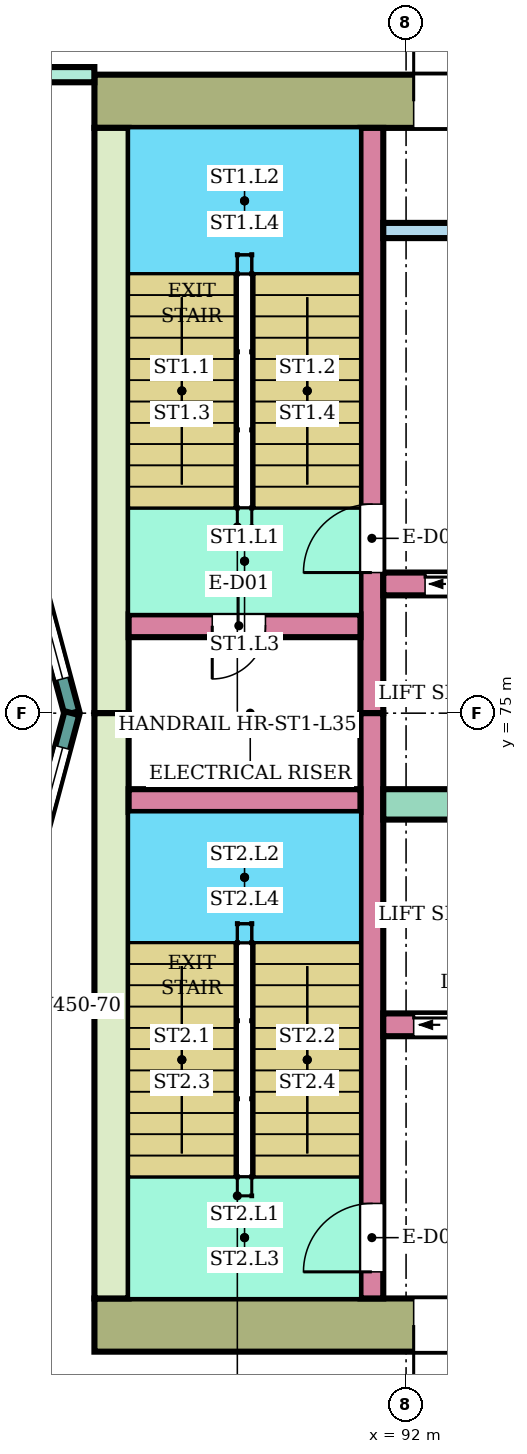
"""IFC4 building model, lengths in metres.
Left out: names, types, materials, properties, quantities, classifications, styles, units other than length and angle.
Written with IfcOpenShell. Run it as: python <this file> out.ifc"""

import sys

from ifc_helpers import new_model, si_unit, direction, frame, frame_2d, origin, place, context, subcontext, project, spatial, rectangle, extrude, element, fill, save


model = new_model("IFC4")
c1 = context("Model", 3, precision=1e-05, world=origin(), true_north=direction((0.0, 1.0)))
c2 = subcontext(c1, "Body", "Model", "MODEL_VIEW")
j1 = project(units=[si_unit("LENGTHUNIT", "METRE"), si_unit("PLANEANGLEUNIT", "RADIAN")], contexts=[c1])
p1 = place(None, origin())
s1 = spatial("IfcSite", under=j1, at=p1, CompositionType="ELEMENT")
p2 = place(p1, origin())
s2 = spatial("IfcBuilding", under=s1, at=p2, CompositionType="ELEMENT")
p3 = place(p2, frame((0.0, 0.0, 149.7)))
s3 = spatial("IfcBuildingStorey", under=s2, at=p3, CompositionType="ELEMENT", Elevation=149.7)
p4 = place(p3, frame((87.9, 83.05, 0.0), z_axis=(0.0, 0.0, 1.0), x_axis=(1.0, 0.0, 0.0)))
e1 = element("IfcWall", 1, at=p4, inside=s3, PredefinedType="SHEAR", context=c2, shape_type="SweptSolid", body=[
    extrude(rectangle(XDim=14.8, YDim=0.7, at=frame_2d((7.4, 0.0))), origin(), (0.0, 0.0, 1.0), 7.68),
])
p5 = place(p4, frame((4.2, 0.0, 0.0)))
e2 = element("IfcOpeningElement", 2, at=p5, cuts=e1, PredefinedType="OPENING", context=c2, shape_type="SweptSolid", body=[
    extrude(rectangle(XDim=2.4, YDim=2.4, at=frame_2d((1.2, 1.2))), frame((0.0, 0.36, 0.0), z_axis=(0.0, -1.0, 0.0), x_axis=(1.0, 0.0, 0.0)), (0.0, 0.0, 1.0), 0.72),
])
p6 = place(p3, frame((87.9, 66.95, 0.0), z_axis=(0.0, 0.0, 1.0), x_axis=(1.0, 0.0, 0.0)))
e3 = element("IfcWall", 3, at=p6, inside=s3, PredefinedType="SHEAR", context=c2, shape_type="SweptSolid", body=[
    extrude(rectangle(XDim=14.8, YDim=0.7, at=frame_2d((7.4, 0.0))), origin(), (0.0, 0.0, 1.0), 7.68),
])
p7 = place(p6, frame((4.2, 0.0, 0.0)))
e4 = element("IfcOpeningElement", 4, at=p7, cuts=e3, PredefinedType="OPENING", context=c2, shape_type="SweptSolid", body=[
    extrude(rectangle(XDim=2.4, YDim=2.4, at=frame_2d((1.2, 1.2))), frame((0.0, 0.36, 0.0), z_axis=(0.0, -1.0, 0.0), x_axis=(1.0, 0.0, 0.0)), (0.0, 0.0, 1.0), 0.72),
])
for number, where, z_axis, x_axis in (
    (5, (88.125, 75.0, 0.0), (0.0, 0.0, 1.0), (0.0, 1.0, 0.0)),
    (6, (88.125, 67.3, 0.0), (0.0, 0.0, 1.0), (0.0, 1.0, 0.0)),
):
    element("IfcWall", number, at=place(p3, frame(where, z_axis=z_axis, x_axis=x_axis)), inside=s3, PredefinedType="SHEAR", context=c2, shape_type="SweptSolid", body=[
        extrude(rectangle(XDim=7.7, YDim=0.45, at=frame_2d((3.85, 0.0))), origin(), (0.0, 0.0, 1.0), 7.68),
    ])
p8 = place(p3, frame((91.55, 75.0, 0.0), z_axis=(0.0, 0.0, 1.0), x_axis=(0.0, 1.0, 0.0)))
e7 = element("IfcWall", 7, at=p8, inside=s3, PredefinedType="SHEAR", context=c2, shape_type="SweptSolid", body=[
    extrude(rectangle(XDim=7.7, YDim=0.3, at=frame_2d((3.85, 0.0))), origin(), (0.0, 0.0, 1.0), 7.68),
])
p9 = place(p8, frame((1.85, 0.0, 0.0)))
e8 = element("IfcOpeningElement", 8, at=p9, cuts=e7, PredefinedType="OPENING", context=c2, shape_type="SweptSolid", body=[
    extrude(rectangle(XDim=0.9, YDim=2.1, at=frame_2d((0.45, 1.05))), frame((0.0, 0.16, 0.0), z_axis=(0.0, -1.0, 0.0), x_axis=(1.0, 0.0, 0.0)), (0.0, 0.0, 1.0), 0.32),
])
p10 = place(p3, frame((91.55, 67.3, 0.0), z_axis=(0.0, 0.0, 1.0), x_axis=(0.0, 1.0, 0.0)))
e9 = element("IfcWall", 9, at=p10, inside=s3, PredefinedType="SHEAR", context=c2, shape_type="SweptSolid", body=[
    extrude(rectangle(XDim=7.7, YDim=0.3, at=frame_2d((3.85, 0.0))), origin(), (0.0, 0.0, 1.0), 7.68),
])
p11 = place(p10, frame((0.35, 0.0, 0.0)))
e10 = element("IfcOpeningElement", 10, at=p11, cuts=e9, PredefinedType="OPENING", context=c2, shape_type="SweptSolid", body=[
    extrude(rectangle(XDim=0.9, YDim=2.1, at=frame_2d((0.45, 1.05))), frame((0.0, 0.16, 0.0), z_axis=(0.0, -1.0, 0.0), x_axis=(1.0, 0.0, 0.0)), (0.0, 0.0, 1.0), 0.32),
])
p12 = place(p3, frame((88.35, 76.15, 0.0), z_axis=(0.0, 0.0, 1.0), x_axis=(1.0, 0.0, 0.0)))
e11 = element("IfcWall", 11, at=p12, inside=s3, PredefinedType="SHEAR", context=c2, shape_type="SweptSolid", body=[
    extrude(rectangle(XDim=3.05, YDim=0.3, at=frame_2d((1.525, 0.0))), origin(), (0.0, 0.0, 1.0), 7.68),
])
p13 = place(p12, frame((1.1, 0.0, 0.0)))
e12 = element("IfcOpeningElement", 12, at=p13, cuts=e11, PredefinedType="OPENING", context=c2, shape_type="SweptSolid", body=[
    extrude(rectangle(XDim=0.7, YDim=2.0, at=frame_2d((0.35, 1.0))), frame((0.0, 0.16, 0.0), z_axis=(0.0, -1.0, 0.0), x_axis=(1.0, 0.0, 0.0)), (0.0, 0.0, 1.0), 0.32),
])
p14 = place(p3, frame((88.35, 73.85, 0.0), z_axis=(0.0, 0.0, 1.0), x_axis=(1.0, 0.0, 0.0)))
e13 = element("IfcWall", 13, at=p14, inside=s3, PredefinedType="SHEAR", context=c2, shape_type="SweptSolid", body=[
    extrude(rectangle(XDim=3.05, YDim=0.3, at=frame_2d((1.525, 0.0))), origin(), (0.0, 0.0, 1.0), 7.68),
])
p15 = place(p3, frame((91.7, 76.7, 0.0), z_axis=(0.0, 0.0, 1.0), x_axis=(1.0, 0.0, 0.0)))
e14 = element("IfcWall", 14, at=p15, inside=s3, PredefinedType="SHEAR", context=c2, shape_type="SweptSolid", body=[
    extrude(rectangle(XDim=11.0, YDim=0.3, at=frame_2d((5.5, 0.0))), origin(), (0.0, 0.0, 1.0), 7.68),
])
p16 = place(p15, frame((0.55, 0.0, 0.0)))
e15 = element("IfcOpeningElement", 15, at=p16, cuts=e14, PredefinedType="OPENING", context=c2, shape_type="SweptSolid", body=[
    extrude(rectangle(XDim=1.1, YDim=2.1, at=frame_2d((0.55, 1.05))), frame((0.0, 0.16, 0.0), z_axis=(0.0, -1.0, 0.0), x_axis=(1.0, 0.0, 0.0)), (0.0, 0.0, 1.0), 0.32),
])
p17 = place(p15, frame((3.0, 0.0, 0.0)))
e16 = element("IfcOpeningElement", 16, at=p17, cuts=e14, PredefinedType="OPENING", context=c2, shape_type="SweptSolid", body=[
    extrude(rectangle(XDim=1.2, YDim=2.1, at=frame_2d((0.6, 1.05))), frame((0.0, 0.16, 0.0), z_axis=(0.0, -1.0, 0.0), x_axis=(1.0, 0.0, 0.0)), (0.0, 0.0, 1.0), 0.32),
])
p18 = place(p15, frame((5.5, 0.0, 0.0)))
e17 = element("IfcOpeningElement", 17, at=p18, cuts=e14, PredefinedType="OPENING", context=c2, shape_type="SweptSolid", body=[
    extrude(rectangle(XDim=1.2, YDim=2.1, at=frame_2d((0.6, 1.05))), frame((0.0, 0.16, 0.0), z_axis=(0.0, -1.0, 0.0), x_axis=(1.0, 0.0, 0.0)), (0.0, 0.0, 1.0), 0.32),
])
p19 = place(p15, frame((8.1, 0.0, 0.0)))
e18 = element("IfcOpeningElement", 18, at=p19, cuts=e14, PredefinedType="OPENING", context=c2, shape_type="SweptSolid", body=[
    extrude(rectangle(XDim=1.0, YDim=2.1, at=frame_2d((0.5, 1.05))), frame((0.0, 0.16, 0.0), z_axis=(0.0, -1.0, 0.0), x_axis=(1.0, 0.0, 0.0)), (0.0, 0.0, 1.0), 0.32),
])
p20 = place(p3, frame((91.7, 73.8, 0.0), z_axis=(0.0, 0.0, 1.0), x_axis=(1.0, 0.0, 0.0)))
e19 = element("IfcWall", 19, at=p20, inside=s3, PredefinedType="SHEAR", context=c2, shape_type="SweptSolid", body=[
    extrude(rectangle(XDim=11.0, YDim=0.4, at=frame_2d((5.5, 0.0))), origin(), (0.0, 0.0, 1.0), 7.68),
])
p21 = place(p3, frame((91.7, 70.9, 0.0), z_axis=(0.0, 0.0, 1.0), x_axis=(1.0, 0.0, 0.0)))
e20 = element("IfcWall", 20, at=p21, inside=s3, PredefinedType="SHEAR", context=c2, shape_type="SweptSolid", body=[
    extrude(rectangle(XDim=11.0, YDim=0.3, at=frame_2d((5.5, 0.0))), origin(), (0.0, 0.0, 1.0), 7.68),
])
p22 = place(p21, frame((0.4, 0.0, 0.0)))
e21 = element("IfcOpeningElement", 21, at=p22, cuts=e20, PredefinedType="OPENING", context=c2, shape_type="SweptSolid", body=[
    extrude(rectangle(XDim=1.4, YDim=2.1, at=frame_2d((0.7, 1.05))), frame((0.0, 0.16, 0.0), z_axis=(0.0, -1.0, 0.0), x_axis=(1.0, 0.0, 0.0)), (0.0, 0.0, 1.0), 0.32),
])
p23 = place(p21, frame((3.0, 0.0, 0.0)))
e22 = element("IfcOpeningElement", 22, at=p23, cuts=e20, PredefinedType="OPENING", context=c2, shape_type="SweptSolid", body=[
    extrude(rectangle(XDim=1.2, YDim=2.1, at=frame_2d((0.6, 1.05))), frame((0.0, 0.16, 0.0), z_axis=(0.0, -1.0, 0.0), x_axis=(1.0, 0.0, 0.0)), (0.0, 0.0, 1.0), 0.32),
])
p24 = place(p21, frame((5.4, 0.0, 0.0)))
e23 = element("IfcOpeningElement", 23, at=p24, cuts=e20, PredefinedType="OPENING", context=c2, shape_type="SweptSolid", body=[
    extrude(rectangle(XDim=1.4, YDim=2.1, at=frame_2d((0.7, 1.05))), frame((0.0, 0.16, 0.0), z_axis=(0.0, -1.0, 0.0), x_axis=(1.0, 0.0, 0.0)), (0.0, 0.0, 1.0), 0.32),
])
p25 = place(p21, frame((8.1, 0.0, 0.0)))
e24 = element("IfcOpeningElement", 24, at=p25, cuts=e20, PredefinedType="OPENING", context=c2, shape_type="SweptSolid", body=[
    extrude(rectangle(XDim=1.0, YDim=2.1, at=frame_2d((0.5, 1.05))), frame((0.0, 0.16, 0.0), z_axis=(0.0, -1.0, 0.0), x_axis=(1.0, 0.0, 0.0)), (0.0, 0.0, 1.0), 0.32),
])
p26 = place(p3, frame((91.7, 81.35, 0.0), z_axis=(0.0, 0.0, 1.0), x_axis=(1.0, 0.0, 0.0)))
e25 = element("IfcWall", 25, at=p26, inside=s3, PredefinedType="SHEAR", context=c2, shape_type="SweptSolid", body=[
    extrude(rectangle(XDim=4.5, YDim=0.2, at=frame_2d((2.25, 0.0))), origin(), (0.0, 0.0, 1.0), 7.68),
])
p27 = place(p3, frame((87.604, 75.0, 0.0), z_axis=(0.0, 0.0, 1.0), x_axis=(-0.258789828301, 0.965933654434, 0.0)))
e26 = element("IfcWall", 26, at=p27, inside=s3, PredefinedType="NOTDEFINED", context=c2, shape_type="SweptSolid", body=[
    extrude(rectangle(XDim=3.936, YDim=0.2, at=frame_2d((1.968, 0.0))), origin(), (0.0, 0.0, 1.0), 8.0),
])
p28 = place(p27, frame((0.468, 0.0, 0.9)))
e27 = element("IfcOpeningElement", 27, at=p28, cuts=e26, PredefinedType="OPENING", context=c2, shape_type="SweptSolid", body=[
    extrude(rectangle(XDim=3.0, YDim=2.3, at=frame_2d((1.5, 1.15))), frame((0.0, 0.11, 0.0), z_axis=(0.0, -1.0, 0.0), x_axis=(1.0, 0.0, 0.0)), (0.0, 0.0, 1.0), 0.22),
])
p29 = place(p3, frame((86.585, 71.198, 0.0), z_axis=(0.0, 0.0, 1.0), x_axis=(0.258789828301, 0.965933654434, 0.0)))
e28 = element("IfcWall", 28, at=p29, inside=s3, PredefinedType="NOTDEFINED", context=c2, shape_type="SweptSolid", body=[
    extrude(rectangle(XDim=3.936, YDim=0.2, at=frame_2d((1.968, 0.0))), origin(), (0.0, 0.0, 1.0), 8.0),
])
p30 = place(p29, frame((0.468, 0.0, 0.9)))
e29 = element("IfcOpeningElement", 29, at=p30, cuts=e28, PredefinedType="OPENING", context=c2, shape_type="SweptSolid", body=[
    extrude(rectangle(XDim=3.0, YDim=2.3, at=frame_2d((1.5, 1.15))), frame((0.0, 0.11, 0.0), z_axis=(0.0, -1.0, 0.0), x_axis=(1.0, 0.0, 0.0)), (0.0, 0.0, 1.0), 0.22),
])
p31 = place(p3, frame((84.5, 82.794, 0.0), z_axis=(0.0, 0.0, 1.0), x_axis=(0.499999880539, 0.866025472755, 0.0)))
e30 = element("IfcWall", 30, at=p31, inside=s3, PredefinedType="NOTDEFINED", context=c2, shape_type="SweptSolid", body=[
    extrude(rectangle(XDim=8.1, YDim=0.2, at=frame_2d((4.05, 0.0))), origin(), (0.0, 0.0, 1.0), 8.0),
])
p32 = place(p31, frame((1.0, 0.0, 0.3)))
e31 = element("IfcOpeningElement", 31, at=p32, cuts=e30, PredefinedType="OPENING", context=c2, shape_type="SweptSolid", body=[
    extrude(rectangle(XDim=2.4, YDim=3.6, at=frame_2d((1.2, 1.8))), frame((0.0, 0.11, 0.0), z_axis=(0.0, -1.0, 0.0), x_axis=(1.0, 0.0, 0.0)), (0.0, 0.0, 1.0), 0.22),
])
p33 = place(p31, frame((3.85, 0.0, 0.0)))
e32 = element("IfcOpeningElement", 32, at=p33, cuts=e30, PredefinedType="OPENING", context=c2, shape_type="SweptSolid", body=[
    extrude(rectangle(XDim=1.8, YDim=2.4, at=frame_2d((0.9, 1.2))), frame((0.0, 0.11, 0.0), z_axis=(0.0, -1.0, 0.0), x_axis=(1.0, 0.0, 0.0)), (0.0, 0.0, 1.0), 0.22),
])
p34 = place(p31, frame((6.1, 0.0, 0.3)))
e33 = element("IfcOpeningElement", 33, at=p34, cuts=e30, PredefinedType="OPENING", context=c2, shape_type="SweptSolid", body=[
    extrude(rectangle(XDim=1.6, YDim=3.6, at=frame_2d((0.8, 1.8))), frame((0.0, 0.11, 0.0), z_axis=(0.0, -1.0, 0.0), x_axis=(1.0, 0.0, 0.0)), (0.0, 0.0, 1.0), 0.22),
])
p35 = place(p3, frame((84.5, 67.206, 0.0), z_axis=(0.0, 0.0, 1.0), x_axis=(0.499999880539, -0.866025472755, 0.0)))
e34 = element("IfcWall", 34, at=p35, inside=s3, PredefinedType="NOTDEFINED", context=c2, shape_type="SweptSolid", body=[
    extrude(rectangle(XDim=8.1, YDim=0.2, at=frame_2d((4.05, 0.0))), origin(), (0.0, 0.0, 1.0), 8.0),
])
p36 = place(p35, frame((1.0, 0.0, 0.3)))
e35 = element("IfcOpeningElement", 35, at=p36, cuts=e34, PredefinedType="OPENING", context=c2, shape_type="SweptSolid", body=[
    extrude(rectangle(XDim=2.4, YDim=3.6, at=frame_2d((1.2, 1.8))), frame((0.0, 0.11, 0.0), z_axis=(0.0, -1.0, 0.0), x_axis=(1.0, 0.0, 0.0)), (0.0, 0.0, 1.0), 0.22),
])
p37 = place(p35, frame((3.85, 0.0, 0.0)))
e36 = element("IfcOpeningElement", 36, at=p37, cuts=e34, PredefinedType="OPENING", context=c2, shape_type="SweptSolid", body=[
    extrude(rectangle(XDim=1.8, YDim=2.4, at=frame_2d((0.9, 1.2))), frame((0.0, 0.11, 0.0), z_axis=(0.0, -1.0, 0.0), x_axis=(1.0, 0.0, 0.0)), (0.0, 0.0, 1.0), 0.22),
])
p38 = place(p35, frame((6.1, 0.0, 0.3)))
e37 = element("IfcOpeningElement", 37, at=p38, cuts=e34, PredefinedType="OPENING", context=c2, shape_type="SweptSolid", body=[
    extrude(rectangle(XDim=1.6, YDim=3.6, at=frame_2d((0.8, 1.8))), frame((0.0, 0.11, 0.0), z_axis=(0.0, -1.0, 0.0), x_axis=(1.0, 0.0, 0.0)), (0.0, 0.0, 1.0), 0.22),
])
p39 = place(p3, frame((84.851, 83.4, 0.0), z_axis=(0.0, 0.0, 1.0), x_axis=(1.0, 0.0, 0.0)))
e38 = element("IfcWall", 38, at=p39, inside=s3, PredefinedType="PARTITIONING", context=c2, shape_type="SweptSolid", body=[
    extrude(rectangle(XDim=3.048, YDim=0.2, at=frame_2d((1.524, 0.0))), origin(), (0.0, 0.0, 1.0), 7.55),
])
p40 = place(p28, origin())
e39 = element("IfcWindow", 39, at=p40, inside=s3, PartitioningType="SINGLE_PANEL", PredefinedType="WINDOW", context=c2, shape_type="SweptSolid", body=[
    extrude(rectangle(XDim=3.0, YDim=2.3, at=frame_2d((1.5, 1.15))), frame((0.0, 0.03, 0.0), z_axis=(0.0, -1.0, 0.0), x_axis=(1.0, 0.0, 0.0)), (0.0, 0.0, 1.0), 0.06),
])
fill(e27, e39)
p41 = place(p30, origin())
e40 = element("IfcWindow", 40, at=p41, inside=s3, PartitioningType="SINGLE_PANEL", PredefinedType="WINDOW", context=c2, shape_type="SweptSolid", body=[
    extrude(rectangle(XDim=3.0, YDim=2.3, at=frame_2d((1.5, 1.15))), frame((0.0, 0.03, 0.0), z_axis=(0.0, -1.0, 0.0), x_axis=(1.0, 0.0, 0.0)), (0.0, 0.0, 1.0), 0.06),
])
fill(e29, e40)
p42 = place(p13, frame((0.7, 0.0, 0.0), z_axis=(0.0, 0.0, 1.0), x_axis=(-1.0, 0.0, 0.0)))
e41 = element("IfcDoor", 41, at=p42, inside=s3, OperationType="SINGLE_SWING_RIGHT", PredefinedType="DOOR", context=c2, shape_type="SweptSolid", body=[
    extrude(rectangle(XDim=0.7, YDim=2.0, at=frame_2d((0.35, 1.0))), frame((0.0, 0.025, 0.0), z_axis=(0.0, -1.0, 0.0), x_axis=(1.0, 0.0, 0.0)), (0.0, 0.0, 1.0), 0.05),
])
fill(e12, e41)
p43 = place(p9, origin())
e42 = element("IfcDoor", 42, at=p43, inside=s3, OperationType="SINGLE_SWING_LEFT", PredefinedType="DOOR", context=c2, shape_type="SweptSolid", body=[
    extrude(rectangle(XDim=0.9, YDim=2.1, at=frame_2d((0.45, 1.05))), frame((0.0, 0.025, 0.0), z_axis=(0.0, -1.0, 0.0), x_axis=(1.0, 0.0, 0.0)), (0.0, 0.0, 1.0), 0.05),
])
fill(e8, e42)
p44 = place(p11, origin())
e43 = element("IfcDoor", 43, at=p44, inside=s3, OperationType="SINGLE_SWING_LEFT", PredefinedType="DOOR", context=c2, shape_type="SweptSolid", body=[
    extrude(rectangle(XDim=0.9, YDim=2.1, at=frame_2d((0.45, 1.05))), frame((0.0, 0.025, 0.0), z_axis=(0.0, -1.0, 0.0), x_axis=(1.0, 0.0, 0.0)), (0.0, 0.0, 1.0), 0.05),
])
fill(e10, e43)
p45 = place(p16, origin())
e44 = element("IfcDoor", 44, at=p45, inside=s3, OperationType="DOUBLE_DOOR_SLIDING", PredefinedType="DOOR", context=c2, shape_type="SweptSolid", body=[
    extrude(rectangle(XDim=1.1, YDim=2.1, at=frame_2d((0.55, 1.05))), frame((0.0, 0.025, 0.0), z_axis=(0.0, -1.0, 0.0), x_axis=(1.0, 0.0, 0.0)), (0.0, 0.0, 1.0), 0.05),
])
fill(e15, e44)
p46 = place(p22, origin())
e45 = element("IfcDoor", 45, at=p46, inside=s3, OperationType="DOUBLE_DOOR_SLIDING", PredefinedType="DOOR", context=c2, shape_type="SweptSolid", body=[
    extrude(rectangle(XDim=1.4, YDim=2.1, at=frame_2d((0.7, 1.05))), frame((0.0, 0.025, 0.0), z_axis=(0.0, -1.0, 0.0), x_axis=(1.0, 0.0, 0.0)), (0.0, 0.0, 1.0), 0.05),
])
fill(e21, e45)
p47 = place(p5, origin())
e46 = element("IfcDoor", 46, at=p47, inside=s3, OperationType="DOUBLE_DOOR_SINGLE_SWING", PredefinedType="DOOR", context=c2, shape_type="SweptSolid", body=[
    extrude(rectangle(XDim=2.4, YDim=2.4, at=frame_2d((1.2, 1.2))), frame((0.0, 0.025, 0.0), z_axis=(0.0, -1.0, 0.0), x_axis=(1.0, 0.0, 0.0)), (0.0, 0.0, 1.0), 0.05),
])
fill(e2, e46)
p48 = place(p7, frame((2.4, 0.0, 0.0), z_axis=(0.0, 0.0, 1.0), x_axis=(-1.0, 0.0, 0.0)))
e47 = element("IfcDoor", 47, at=p48, inside=s3, OperationType="DOUBLE_DOOR_SINGLE_SWING", PredefinedType="DOOR", context=c2, shape_type="SweptSolid", body=[
    extrude(rectangle(XDim=2.4, YDim=2.4, at=frame_2d((1.2, 1.2))), frame((0.0, 0.025, 0.0), z_axis=(0.0, -1.0, 0.0), x_axis=(1.0, 0.0, 0.0)), (0.0, 0.0, 1.0), 0.05),
])
fill(e4, e47)
save(model, sys.argv[1])
